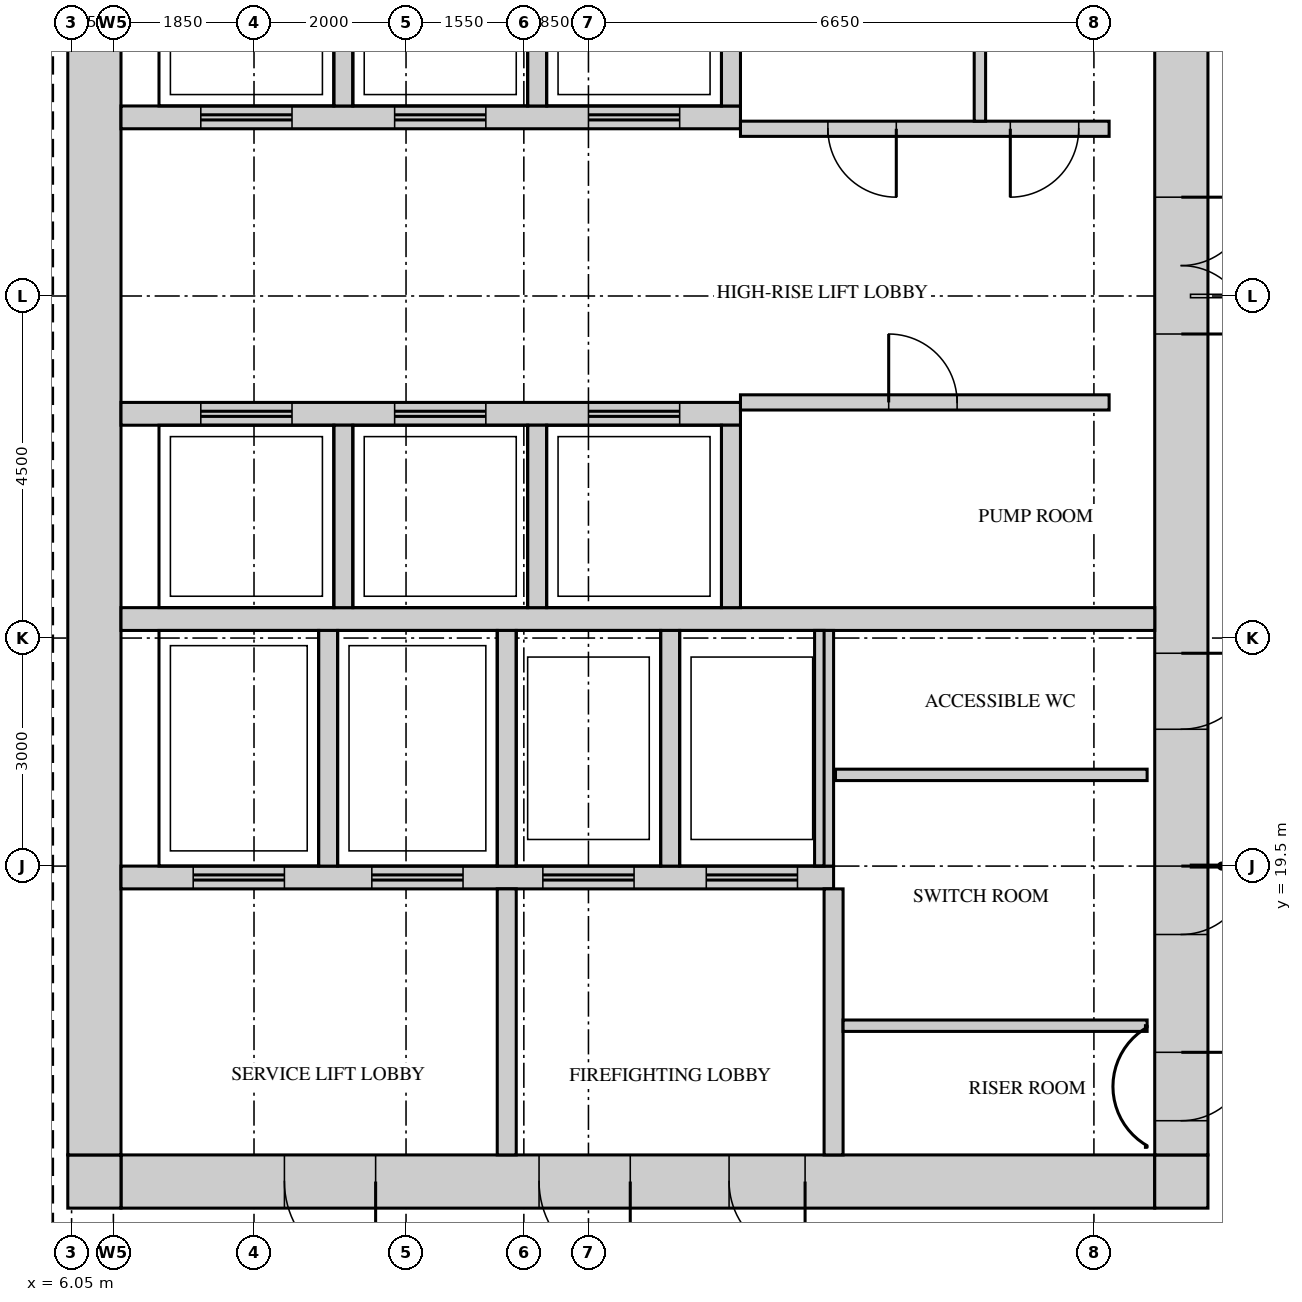
"""IFC4 building model, lengths in metres.
Left out: names, types, materials, properties, quantities, classifications, styles, units other than length and angle.
Written with IfcOpenShell. Run it as: python <this file> out.ifc"""

import sys

from ifc_helpers import new_model, si_unit, direction, frame, frame_2d, origin, place, context, subcontext, project, spatial, rectangle, extrude, source, transform, mapped, element, fill, save


model = new_model("IFC4")
c1 = context("Model", 3, precision=1e-05, world=origin(), true_north=direction((0.0, 1.0)))
c2 = subcontext(c1, "Body", "Model", "MODEL_VIEW")
j1 = project(units=[si_unit("LENGTHUNIT", "METRE"), si_unit("PLANEANGLEUNIT", "RADIAN")], contexts=[c1])
p1 = place(None, origin())
s1 = spatial("IfcSite", under=j1, at=p1, CompositionType="ELEMENT")
p2 = place(p1, origin())
s2 = spatial("IfcBuilding", under=s1, at=p2, CompositionType="ELEMENT")
p3 = place(p2, frame((0.0, 0.0, 274.2)))
s3 = spatial("IfcBuildingStorey", under=s2, at=p3, CompositionType="ELEMENT", Elevation=274.2)
m1 = source(origin(), c2, "Body", "SweptSolid", [
    extrude(rectangle(XDim=13.6, YDim=0.7, at=frame_2d((6.8, 0.0))), origin(), (0.0, 0.0, 1.0), 7.75),
])
p4 = place(p3, frame((6.7, 15.35, 0.0), z_axis=(0.0, 0.0, 1.0), x_axis=(1.0, 0.0, 0.0)))
e1 = element("IfcWall", 1, at=p4, inside=s3, PredefinedType="SHEAR", context=c2, shape_type="MappedRepresentation", body=[
    mapped(m1, transform((0.0, 0.0, 0.0))),
])
m2 = source(origin(), c2, "Body", "SweptSolid", [
    extrude(rectangle(XDim=1.2, YDim=2.1, at=frame_2d((0.6, 1.05))), frame((0.0, 0.36, 0.0), z_axis=(0.0, -1.0, 0.0), x_axis=(1.0, 0.0, 0.0)), (0.0, 0.0, 1.0), 0.72),
])
p5 = place(p4, frame((5.5, 0.0, 0.0)))
e2 = element("IfcOpeningElement", 2, at=p5, cuts=e1, PredefinedType="OPENING", context=c2, shape_type="MappedRepresentation", body=[
    mapped(m2, transform((0.0, 0.0, 0.0))),
])
p6 = place(p4, frame((2.15, 0.0, 0.0)))
e3 = element("IfcOpeningElement", 3, at=p6, cuts=e1, PredefinedType="OPENING", context=c2, shape_type="MappedRepresentation", body=[
    mapped(m2, transform((0.0, 0.0, 0.0))),
])
m3 = source(origin(), c2, "Body", "SweptSolid", [
    extrude(rectangle(XDim=1.0, YDim=2.1, at=frame_2d((0.5, 1.05))), frame((0.0, 0.36, 0.0), z_axis=(0.0, -1.0, 0.0), x_axis=(1.0, 0.0, 0.0)), (0.0, 0.0, 1.0), 0.72),
])
p7 = place(p4, frame((8.0, 0.0, 0.0)))
e4 = element("IfcOpeningElement", 4, at=p7, cuts=e1, PredefinedType="OPENING", context=c2, shape_type="MappedRepresentation", body=[
    mapped(m3, transform((0.0, 0.0, 0.0))),
])
m4 = source(origin(), c2, "Body", "SweptSolid", [
    extrude(rectangle(XDim=0.7, YDim=0.7, at=frame_2d((0.35, 0.0))), origin(), (0.0, 0.0, 1.0), 7.75),
])
for number, where, z_axis, x_axis in (
    (5, (20.3, 15.35, 0.0), (0.0, 0.0, 1.0), (1.0, 0.0, 0.0)),
    (6, (6.0, 15.35, 0.0), (0.0, 0.0, 1.0), (1.0, 0.0, 0.0)),
):
    element("IfcWall", number, at=place(p3, frame(where, z_axis=z_axis, x_axis=x_axis)), inside=s3, PredefinedType="SHEAR", context=c2, shape_type="MappedRepresentation", body=[
        mapped(m4, transform((0.0, 0.0, 0.0))),
    ])
m5 = source(origin(), c2, "Body", "SweptSolid", [
    extrude(rectangle(XDim=22.6, YDim=0.7, at=frame_2d((11.3, 0.0))), origin(), (0.0, 0.0, 1.0), 7.75),
])
p8 = place(p3, frame((20.65, 15.7, 0.0), z_axis=(0.0, 0.0, 1.0), x_axis=(0.0, 1.0, 0.0)))
e7 = element("IfcWall", 7, at=p8, inside=s3, PredefinedType="SHEAR", context=c2, shape_type="MappedRepresentation", body=[
    mapped(m5, transform((0.0, 0.0, 0.0))),
])
m6 = source(origin(), c2, "Body", "SweptSolid", [
    extrude(rectangle(XDim=1.8, YDim=2.1, at=frame_2d((0.9, 1.05))), frame((0.0, 0.36, 0.0), z_axis=(0.0, -1.0, 0.0), x_axis=(1.0, 0.0, 0.0)), (0.0, 0.0, 1.0), 0.72),
])
p9 = place(p8, frame((10.8, 0.0, 0.0)))
e8 = element("IfcOpeningElement", 8, at=p9, cuts=e7, PredefinedType="OPENING", context=c2, shape_type="MappedRepresentation", body=[
    mapped(m6, transform((0.0, 0.0, 0.0))),
])
m7 = source(origin(), c2, "Body", "SweptSolid", [
    extrude(rectangle(XDim=0.9, YDim=2.1, at=frame_2d((0.45, 1.05))), frame((0.0, 0.36, 0.0), z_axis=(0.0, -1.0, 0.0), x_axis=(1.0, 0.0, 0.0)), (0.0, 0.0, 1.0), 0.72),
])
p10 = place(p8, frame((0.45, 0.0, 0.0)))
e9 = element("IfcOpeningElement", 9, at=p10, cuts=e7, PredefinedType="OPENING", context=c2, shape_type="MappedRepresentation", body=[
    mapped(m7, transform((0.0, 0.0, 0.0))),
])
p11 = place(p8, frame((2.9, 0.0, 0.0)))
e10 = element("IfcOpeningElement", 10, at=p11, cuts=e7, PredefinedType="OPENING", context=c2, shape_type="MappedRepresentation", body=[
    mapped(m7, transform((0.0, 0.0, 0.0))),
])
p12 = place(p8, frame((5.6, 0.0, 0.0)))
e11 = element("IfcOpeningElement", 11, at=p12, cuts=e7, PredefinedType="OPENING", context=c2, shape_type="MappedRepresentation", body=[
    mapped(m3, transform((0.0, 0.0, 0.0))),
])
p13 = place(p3, frame((6.35, 15.7, 0.0), z_axis=(0.0, 0.0, 1.0), x_axis=(0.0, 1.0, 0.0)))
e12 = element("IfcWall", 12, at=p13, inside=s3, PredefinedType="SHEAR", context=c2, shape_type="MappedRepresentation", body=[
    mapped(m5, transform((0.0, 0.0, 0.0))),
])
m8 = source(origin(), c2, "Body", "SweptSolid", [
    extrude(rectangle(XDim=13.6, YDim=0.3, at=frame_2d((6.8, 0.0))), origin(), (0.0, 0.0, 1.0), 7.75),
])
p14 = place(p3, frame((6.7, 22.75, 0.0), z_axis=(0.0, 0.0, 1.0), x_axis=(1.0, 0.0, 0.0)))
e13 = element("IfcWall", 13, at=p14, inside=s3, PredefinedType="STANDARD", context=c2, shape_type="MappedRepresentation", body=[
    mapped(m8, transform((0.0, 0.0, 0.0))),
])
m9 = source(origin(), c2, "Body", "SweptSolid", [
    extrude(rectangle(XDim=9.375, YDim=0.3, at=frame_2d((4.688, 0.0))), origin(), (0.0, 0.0, 1.0), 7.75),
])
p15 = place(p3, frame((6.7, 19.35, 0.0), z_axis=(0.0, 0.0, 1.0), x_axis=(1.0, 0.0, 0.0)))
e14 = element("IfcWall", 14, at=p15, inside=s3, PredefinedType="STANDARD", context=c2, shape_type="MappedRepresentation", body=[
    mapped(m9, transform((0.0, 0.0, 0.0))),
])
m10 = source(origin(), c2, "Body", "SweptSolid", [
    extrude(rectangle(XDim=1.2, YDim=2.1, at=frame_2d((0.6, 1.05))), frame((0.0, 0.16, 0.0), z_axis=(0.0, -1.0, 0.0), x_axis=(1.0, 0.0, 0.0)), (0.0, 0.0, 1.0), 0.32),
])
p16 = place(p15, frame((0.95, 0.0, 0.0)))
e15 = element("IfcOpeningElement", 15, at=p16, cuts=e14, PredefinedType="OPENING", context=c2, shape_type="MappedRepresentation", body=[
    mapped(m10, transform((0.0, 0.0, 0.0))),
])
p17 = place(p15, frame((3.3, 0.0, 0.0)))
e16 = element("IfcOpeningElement", 16, at=p17, cuts=e14, PredefinedType="OPENING", context=c2, shape_type="MappedRepresentation", body=[
    mapped(m10, transform((0.0, 0.0, 0.0))),
])
p18 = place(p15, frame((5.55, 0.0, 0.0)))
e17 = element("IfcOpeningElement", 17, at=p18, cuts=e14, PredefinedType="OPENING", context=c2, shape_type="MappedRepresentation", body=[
    mapped(m10, transform((0.0, 0.0, 0.0))),
])
p19 = place(p15, frame((7.7, 0.0, 0.0)))
e18 = element("IfcOpeningElement", 18, at=p19, cuts=e14, PredefinedType="OPENING", context=c2, shape_type="MappedRepresentation", body=[
    mapped(m10, transform((0.0, 0.0, 0.0))),
])
m11 = source(origin(), c2, "Body", "SweptSolid", [
    extrude(rectangle(XDim=8.15, YDim=0.3, at=frame_2d((4.075, 0.0))), origin(), (0.0, 0.0, 1.0), 7.75),
])
p20 = place(p3, frame((6.7, 29.35, 0.0), z_axis=(0.0, 0.0, 1.0), x_axis=(1.0, 0.0, 0.0)))
e19 = element("IfcWall", 19, at=p20, inside=s3, PredefinedType="STANDARD", context=c2, shape_type="MappedRepresentation", body=[
    mapped(m11, transform((0.0, 0.0, 0.0))),
])
p21 = place(p20, frame((1.05, 0.0, 0.0)))
e20 = element("IfcOpeningElement", 20, at=p21, cuts=e19, PredefinedType="OPENING", context=c2, shape_type="MappedRepresentation", body=[
    mapped(m10, transform((0.0, 0.0, 0.0))),
])
p22 = place(p20, frame((3.6, 0.0, 0.0)))
e21 = element("IfcOpeningElement", 21, at=p22, cuts=e19, PredefinedType="OPENING", context=c2, shape_type="MappedRepresentation", body=[
    mapped(m10, transform((0.0, 0.0, 0.0))),
])
p23 = place(p20, frame((6.15, 0.0, 0.0)))
e22 = element("IfcOpeningElement", 22, at=p23, cuts=e19, PredefinedType="OPENING", context=c2, shape_type="MappedRepresentation", body=[
    mapped(m10, transform((0.0, 0.0, 0.0))),
])
p24 = place(p3, frame((6.7, 25.45, 0.0), z_axis=(0.0, 0.0, 1.0), x_axis=(1.0, 0.0, 0.0)))
e23 = element("IfcWall", 23, at=p24, inside=s3, PredefinedType="STANDARD", context=c2, shape_type="MappedRepresentation", body=[
    mapped(m11, transform((0.0, 0.0, 0.0))),
])
p25 = place(p24, frame((1.05, 0.0, 0.0)))
e24 = element("IfcOpeningElement", 24, at=p25, cuts=e23, PredefinedType="OPENING", context=c2, shape_type="MappedRepresentation", body=[
    mapped(m10, transform((0.0, 0.0, 0.0))),
])
p26 = place(p24, frame((3.6, 0.0, 0.0)))
e25 = element("IfcOpeningElement", 25, at=p26, cuts=e23, PredefinedType="OPENING", context=c2, shape_type="MappedRepresentation", body=[
    mapped(m10, transform((0.0, 0.0, 0.0))),
])
p27 = place(p24, frame((6.15, 0.0, 0.0)))
e26 = element("IfcOpeningElement", 26, at=p27, cuts=e23, PredefinedType="OPENING", context=c2, shape_type="MappedRepresentation", body=[
    mapped(m10, transform((0.0, 0.0, 0.0))),
])
m12 = source(origin(), c2, "Body", "SweptSolid", [
    extrude(rectangle(XDim=3.1, YDim=0.25, at=frame_2d((1.55, 0.0))), origin(), (0.0, 0.0, 1.0), 7.75),
])
for number, where, z_axis, x_axis in (
    (27, (9.425, 19.5, 0.0), (0.0, 0.0, 1.0), (0.0, 1.0, 0.0)),
    (28, (11.775, 19.5, 0.0), (0.0, 0.0, 1.0), (0.0, 1.0, 0.0)),
    (29, (13.925, 19.5, 0.0), (0.0, 0.0, 1.0), (0.0, 1.0, 0.0)),
    (30, (15.95, 19.5, 0.0), (0.0, 0.0, 1.0), (0.0, 1.0, 0.0)),
):
    element("IfcWall", number, at=place(p3, frame(where, z_axis=z_axis, x_axis=x_axis)), inside=s3, PredefinedType="STANDARD", context=c2, shape_type="MappedRepresentation", body=[
        mapped(m12, transform((0.0, 0.0, 0.0))),
    ])
m13 = source(origin(), c2, "Body", "SweptSolid", [
    extrude(rectangle(XDim=2.4, YDim=0.25, at=frame_2d((1.2, 0.0))), origin(), (0.0, 0.0, 1.0), 7.75),
])
for number, where, z_axis, x_axis in (
    (31, (9.625, 29.5, 0.0), (0.0, 0.0, 1.0), (0.0, 1.0, 0.0)),
    (32, (12.175, 29.5, 0.0), (0.0, 0.0, 1.0), (0.0, 1.0, 0.0)),
    (33, (14.725, 29.5, 0.0), (0.0, 0.0, 1.0), (0.0, 1.0, 0.0)),
):
    element("IfcWall", number, at=place(p3, frame(where, z_axis=z_axis, x_axis=x_axis)), inside=s3, PredefinedType="STANDARD", context=c2, shape_type="MappedRepresentation", body=[
        mapped(m13, transform((0.0, 0.0, 0.0))),
    ])
m14 = source(origin(), c2, "Body", "SweptSolid", [
    extrude(rectangle(XDim=2.4, YDim=0.25, at=frame_2d((1.2, 0.0))), origin(), (0.0, 0.0, 1.0), 7.75),
])
for number, where, z_axis, x_axis in (
    (34, (9.625, 22.9, 0.0), (0.0, 0.0, 1.0), (0.0, 1.0, 0.0)),
    (35, (12.175, 22.9, 0.0), (0.0, 0.0, 1.0), (0.0, 1.0, 0.0)),
    (36, (14.725, 22.9, 0.0), (0.0, 0.0, 1.0), (0.0, 1.0, 0.0)),
):
    element("IfcWall", number, at=place(p3, frame(where, z_axis=z_axis, x_axis=x_axis)), inside=s3, PredefinedType="STANDARD", context=c2, shape_type="MappedRepresentation", body=[
        mapped(m14, transform((0.0, 0.0, 0.0))),
    ])
m15 = source(origin(), c2, "Body", "SweptSolid", [
    extrude(rectangle(XDim=3.5, YDim=0.25, at=frame_2d((1.75, 0.0))), origin(), (0.0, 0.0, 1.0), 7.75),
])
for number, where, z_axis, x_axis in (
    (37, (16.075, 15.7, 0.0), (0.0, 0.0, 1.0), (0.0, 1.0, 0.0)),
    (38, (11.775, 15.7, 0.0), (0.0, 0.0, 1.0), (0.0, 1.0, 0.0)),
):
    element("IfcWall", number, at=place(p3, frame(where, z_axis=z_axis, x_axis=x_axis)), inside=s3, PredefinedType="STANDARD", context=c2, shape_type="MappedRepresentation", body=[
        mapped(m15, transform((0.0, 0.0, 0.0))),
    ])
m16 = source(origin(), c2, "Body", "SweptSolid", [
    extrude(rectangle(XDim=4.0, YDim=0.15, at=frame_2d((2.0, 0.0))), origin(), (0.0, 0.0, 1.0), 7.75),
])
p28 = place(p3, frame((16.2, 17.4, 0.0), z_axis=(0.0, 0.0, 1.0), x_axis=(1.0, 0.0, 0.0)))
e39 = element("IfcWall", 39, at=p28, inside=s3, PredefinedType="PARTITIONING", context=c2, shape_type="MappedRepresentation", body=[
    mapped(m16, transform((0.0, 0.0, 0.0))),
])
m17 = source(origin(), c2, "Body", "SweptSolid", [
    extrude(rectangle(XDim=4.1, YDim=0.15, at=frame_2d((2.05, 0.0))), origin(), (0.0, 0.0, 1.0), 7.75),
])
p29 = place(p3, frame((16.1, 20.7, 0.0), z_axis=(0.0, 0.0, 1.0), x_axis=(1.0, 0.0, 0.0)))
e40 = element("IfcWall", 40, at=p29, inside=s3, PredefinedType="PARTITIONING", context=c2, shape_type="MappedRepresentation", body=[
    mapped(m17, transform((0.0, 0.0, 0.0))),
])
m18 = source(origin(), c2, "Body", "SweptSolid", [
    extrude(rectangle(XDim=4.85, YDim=0.2, at=frame_2d((2.425, 0.0))), origin(), (0.0, 0.0, 1.0), 7.75),
])
p30 = place(p3, frame((14.85, 25.6, 0.0), z_axis=(0.0, 0.0, 1.0), x_axis=(1.0, 0.0, 0.0)))
e41 = element("IfcWall", 41, at=p30, inside=s3, PredefinedType="PARTITIONING", context=c2, shape_type="MappedRepresentation", body=[
    mapped(m18, transform((0.0, 0.0, 0.0))),
])
m19 = source(origin(), c2, "Body", "SweptSolid", [
    extrude(rectangle(XDim=0.9, YDim=2.1, at=frame_2d((0.45, 1.05))), frame((0.0, 0.11, 0.0), z_axis=(0.0, -1.0, 0.0), x_axis=(1.0, 0.0, 0.0)), (0.0, 0.0, 1.0), 0.22),
])
p31 = place(p30, frame((1.95, 0.0, 0.0)))
e42 = element("IfcOpeningElement", 42, at=p31, cuts=e41, PredefinedType="OPENING", context=c2, shape_type="MappedRepresentation", body=[
    mapped(m19, transform((0.0, 0.0, 0.0))),
])
p32 = place(p3, frame((14.85, 29.2, 0.0), z_axis=(0.0, 0.0, 1.0), x_axis=(1.0, 0.0, 0.0)))
e43 = element("IfcWall", 43, at=p32, inside=s3, PredefinedType="PARTITIONING", context=c2, shape_type="MappedRepresentation", body=[
    mapped(m18, transform((0.0, 0.0, 0.0))),
])
p33 = place(p32, frame((1.15, 0.0, 0.0)))
e44 = element("IfcOpeningElement", 44, at=p33, cuts=e43, PredefinedType="OPENING", context=c2, shape_type="MappedRepresentation", body=[
    mapped(m19, transform((0.0, 0.0, 0.0))),
])
p34 = place(p32, frame((3.55, 0.0, 0.0)))
e45 = element("IfcOpeningElement", 45, at=p34, cuts=e43, PredefinedType="OPENING", context=c2, shape_type="MappedRepresentation", body=[
    mapped(m19, transform((0.0, 0.0, 0.0))),
])
m20 = source(origin(), c2, "Body", "SweptSolid", [
    extrude(rectangle(XDim=2.8, YDim=0.15, at=frame_2d((1.4, 0.0))), origin(), (0.0, 0.0, 1.0), 7.75),
])
p35 = place(p3, frame((18.0, 29.3, 0.0), z_axis=(0.0, 0.0, 1.0), x_axis=(0.0, 1.0, 0.0)))
e46 = element("IfcWall", 46, at=p35, inside=s3, PredefinedType="PARTITIONING", context=c2, shape_type="MappedRepresentation", body=[
    mapped(m20, transform((0.0, 0.0, 0.0))),
])
m21 = source(origin(), c2, "Body", "SweptSolid", [
    extrude(rectangle(XDim=0.9, YDim=2.1, at=frame_2d((0.45, 1.05))), frame((0.0, 0.025, 0.0), z_axis=(0.0, -1.0, 0.0), x_axis=(1.0, 0.0, 0.0)), (0.0, 0.0, 1.0), 0.05),
])
p36 = place(p31, origin())
e47 = element("IfcDoor", 47, at=p36, inside=s3, OperationType="SINGLE_SWING_RIGHT", PredefinedType="DOOR", context=c2, shape_type="MappedRepresentation", body=[
    mapped(m21, transform((0.0, 0.0, 0.0))),
])
fill(e42, e47)
p37 = place(p33, origin())
e48 = element("IfcDoor", 48, at=p37, inside=s3, OperationType="SINGLE_SWING_RIGHT", PredefinedType="DOOR", context=c2, shape_type="MappedRepresentation", body=[
    mapped(m21, transform((0.0, 0.0, 0.0))),
])
fill(e44, e48)
p38 = place(p34, origin())
e49 = element("IfcDoor", 49, at=p38, inside=s3, OperationType="SINGLE_SWING_LEFT", PredefinedType="DOOR", context=c2, shape_type="MappedRepresentation", body=[
    mapped(m21, transform((0.0, 0.0, 0.0))),
])
fill(e45, e49)
m22 = source(origin(), c2, "Body", "SweptSolid", [
    extrude(rectangle(XDim=1.8, YDim=2.1, at=frame_2d((0.9, 1.05))), frame((0.0, 0.3, 0.0), z_axis=(0.0, -1.0, 0.0), x_axis=(1.0, 0.0, 0.0)), (0.0, 0.0, 1.0), 0.6),
])
p39 = place(p9, origin())
e50 = element("IfcDoor", 50, at=p39, inside=s3, OperationType="DOUBLE_DOOR_SINGLE_SWING", PredefinedType="DOOR", context=c2, shape_type="MappedRepresentation", body=[
    mapped(m22, transform((0.0, 0.0, 0.0))),
])
fill(e8, e50)
m23 = source(origin(), c2, "Body", "SweptSolid", [
    extrude(rectangle(XDim=0.9, YDim=2.1, at=frame_2d((0.45, 1.05))), frame((0.0, 0.3, 0.0), z_axis=(0.0, -1.0, 0.0), x_axis=(1.0, 0.0, 0.0)), (0.0, 0.0, 1.0), 0.6),
])
p40 = place(p10, origin())
e51 = element("IfcDoor", 51, at=p40, inside=s3, OperationType="SINGLE_SWING_RIGHT", PredefinedType="DOOR", context=c2, shape_type="MappedRepresentation", body=[
    mapped(m23, transform((0.0, 0.0, 0.0))),
])
fill(e9, e51)
p41 = place(p11, origin())
e52 = element("IfcDoor", 52, at=p41, inside=s3, OperationType="SINGLE_SWING_RIGHT", PredefinedType="DOOR", context=c2, shape_type="MappedRepresentation", body=[
    mapped(m23, transform((0.0, 0.0, 0.0))),
])
fill(e10, e52)
m24 = source(origin(), c2, "Body", "SweptSolid", [
    extrude(rectangle(XDim=1.0, YDim=2.1, at=frame_2d((0.5, 1.05))), frame((0.0, 0.3, 0.0), z_axis=(0.0, -1.0, 0.0), x_axis=(1.0, 0.0, 0.0)), (0.0, 0.0, 1.0), 0.6),
])
p42 = place(p12, origin())
e53 = element("IfcDoor", 53, at=p42, inside=s3, OperationType="SINGLE_SWING_RIGHT", PredefinedType="DOOR", context=c2, shape_type="MappedRepresentation", body=[
    mapped(m24, transform((0.0, 0.0, 0.0))),
])
fill(e11, e53)
m25 = source(origin(), c2, "Body", "SweptSolid", [
    extrude(rectangle(XDim=1.2, YDim=2.1, at=frame_2d((0.6, 1.05))), frame((0.0, 0.3, 0.0), z_axis=(0.0, -1.0, 0.0), x_axis=(1.0, 0.0, 0.0)), (0.0, 0.0, 1.0), 0.6),
])
p43 = place(p5, origin())
e54 = element("IfcDoor", 54, at=p43, inside=s3, OperationType="SINGLE_SWING_RIGHT", PredefinedType="DOOR", context=c2, shape_type="MappedRepresentation", body=[
    mapped(m25, transform((0.0, 0.0, 0.0))),
])
fill(e2, e54)
p44 = place(p6, origin())
e55 = element("IfcDoor", 55, at=p44, inside=s3, OperationType="SINGLE_SWING_RIGHT", PredefinedType="DOOR", context=c2, shape_type="MappedRepresentation", body=[
    mapped(m25, transform((0.0, 0.0, 0.0))),
])
fill(e3, e55)
p45 = place(p7, origin())
e56 = element("IfcDoor", 56, at=p45, inside=s3, OperationType="SINGLE_SWING_RIGHT", PredefinedType="DOOR", context=c2, shape_type="MappedRepresentation", body=[
    mapped(m24, transform((0.0, 0.0, 0.0))),
])
fill(e4, e56)
m26 = source(origin(), c2, "Body", "SweptSolid", [
    extrude(rectangle(XDim=1.2, YDim=2.1, at=frame_2d((0.6, 1.05))), frame((0.0, 0.025, 0.0), z_axis=(0.0, -1.0, 0.0), x_axis=(1.0, 0.0, 0.0)), (0.0, 0.0, 1.0), 0.05),
])
p46 = place(p25, origin())
e57 = element("IfcDoor", 57, at=p46, inside=s3, OperationType="DOUBLE_DOOR_SLIDING", PredefinedType="DOOR", context=c2, shape_type="MappedRepresentation", body=[
    mapped(m26, transform((0.0, 0.0, 0.0))),
])
fill(e24, e57)
p47 = place(p26, origin())
e58 = element("IfcDoor", 58, at=p47, inside=s3, OperationType="DOUBLE_DOOR_SLIDING", PredefinedType="DOOR", context=c2, shape_type="MappedRepresentation", body=[
    mapped(m26, transform((0.0, 0.0, 0.0))),
])
fill(e25, e58)
p48 = place(p27, origin())
e59 = element("IfcDoor", 59, at=p48, inside=s3, OperationType="DOUBLE_DOOR_SLIDING", PredefinedType="DOOR", context=c2, shape_type="MappedRepresentation", body=[
    mapped(m26, transform((0.0, 0.0, 0.0))),
])
fill(e26, e59)
p49 = place(p21, origin())
e60 = element("IfcDoor", 60, at=p49, inside=s3, OperationType="DOUBLE_DOOR_SLIDING", PredefinedType="DOOR", context=c2, shape_type="MappedRepresentation", body=[
    mapped(m26, transform((0.0, 0.0, 0.0))),
])
fill(e20, e60)
p50 = place(p22, origin())
e61 = element("IfcDoor", 61, at=p50, inside=s3, OperationType="DOUBLE_DOOR_SLIDING", PredefinedType="DOOR", context=c2, shape_type="MappedRepresentation", body=[
    mapped(m26, transform((0.0, 0.0, 0.0))),
])
fill(e21, e61)
p51 = place(p23, origin())
e62 = element("IfcDoor", 62, at=p51, inside=s3, OperationType="DOUBLE_DOOR_SLIDING", PredefinedType="DOOR", context=c2, shape_type="MappedRepresentation", body=[
    mapped(m26, transform((0.0, 0.0, 0.0))),
])
fill(e22, e62)
p52 = place(p16, origin())
e63 = element("IfcDoor", 63, at=p52, inside=s3, OperationType="DOUBLE_DOOR_SLIDING", PredefinedType="DOOR", context=c2, shape_type="MappedRepresentation", body=[
    mapped(m26, transform((0.0, 0.0, 0.0))),
])
fill(e15, e63)
p53 = place(p17, origin())
e64 = element("IfcDoor", 64, at=p53, inside=s3, OperationType="DOUBLE_DOOR_SLIDING", PredefinedType="DOOR", context=c2, shape_type="MappedRepresentation", body=[
    mapped(m26, transform((0.0, 0.0, 0.0))),
])
fill(e16, e64)
p54 = place(p18, origin())
e65 = element("IfcDoor", 65, at=p54, inside=s3, OperationType="DOUBLE_DOOR_SLIDING", PredefinedType="DOOR", context=c2, shape_type="MappedRepresentation", body=[
    mapped(m26, transform((0.0, 0.0, 0.0))),
])
fill(e17, e65)
p55 = place(p19, origin())
e66 = element("IfcDoor", 66, at=p55, inside=s3, OperationType="DOUBLE_DOOR_SLIDING", PredefinedType="DOOR", context=c2, shape_type="MappedRepresentation", body=[
    mapped(m26, transform((0.0, 0.0, 0.0))),
])
fill(e18, e66)
save(model, sys.argv[1])
